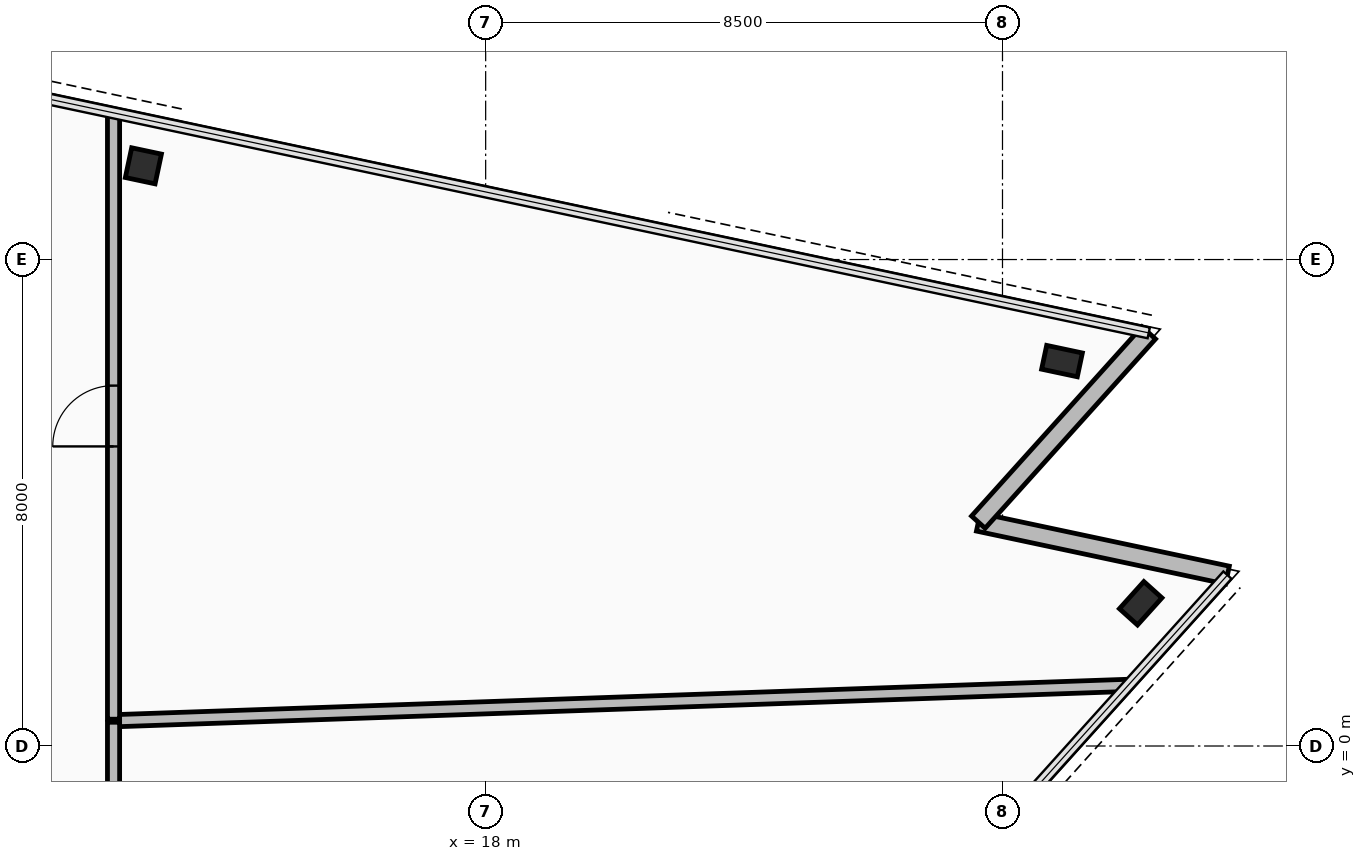
"""IFC4 building model, lengths in metres.
Left out: names, types, materials, properties, quantities, classifications, styles, units other than length and angle.
Written with IfcOpenShell. Run it as: python <this file> out.ifc"""

import sys

from ifc_helpers import new_model, si_unit, direction, frame, frame_2d, origin, origin_2d, place, context, subcontext, project, spatial, rectangle, hollow_rectangle, extrude, element, fill, save


model = new_model("IFC4")
c1 = context("Model", 3, precision=1e-05, world=origin(), true_north=direction((0.0, 1.0)))
c2 = subcontext(c1, "Body", "Model", "MODEL_VIEW")
j1 = project(units=[si_unit("LENGTHUNIT", "METRE"), si_unit("PLANEANGLEUNIT", "RADIAN")], contexts=[c1])
p1 = place(None, origin())
s1 = spatial("IfcSite", under=j1, at=p1, CompositionType="ELEMENT")
p2 = place(p1, origin())
s2 = spatial("IfcBuilding", under=s1, at=p2, CompositionType="ELEMENT")
p3 = place(p2, frame((0.0, 0.0, 218.45)))
s3 = spatial("IfcBuildingStorey", under=s2, at=p3, CompositionType="ELEMENT", Elevation=218.45)
for number, where, z_axis, x_axis in (
    (1, (28.773, 2.347, 0.0), (0.0, 0.0, 1.0), (0.669, 0.743, 0.0)),
    (2, (27.479, 6.33, 0.0), (0.0, 0.0, 1.0), (-0.978, 0.208, 0.0)),
):
    element("IfcColumn", number, at=place(p3, frame(where, z_axis=z_axis, x_axis=x_axis)), inside=s3, PredefinedType="COLUMN", context=c2, shape_type="SweptSolid", body=[
        extrude(hollow_rectangle(XDim=0.4, YDim=0.6, WallThickness=0.03, at=origin_2d()), origin(), (0.0, 0.0, 1.0), 3.6),
    ])
p4 = place(p3, frame((12.371, 9.542, 0.0), z_axis=(0.0, 0.0, 1.0), x_axis=(-0.978147600734, 0.207911690818, 0.0)))
e3 = element("IfcColumn", 3, at=p4, inside=s3, PredefinedType="COLUMN", context=c2, shape_type="SweptSolid", body=[
    extrude(hollow_rectangle(XDim=0.5, YDim=0.5, WallThickness=0.032, at=origin_2d()), origin(), (0.0, 0.0, 1.0), 3.6),
])
for number, where, z_axis, x_axis in (
    (4, (30.199, 2.811, 0.0), (0.0, 0.0, 1.0), (-0.978, 0.208, 0.0)),
    (5, (26.103, 3.681, 0.0), (0.0, 0.0, 1.0), (0.669, 0.743, 0.0)),
):
    element("IfcWall", number, at=place(p3, frame(where, z_axis=z_axis, x_axis=x_axis)), inside=s3, PredefinedType="STANDARD", context=c2, shape_type="SweptSolid", body=[
        extrude(rectangle(XDim=4.188, YDim=0.3, at=frame_2d((2.094, 0.0))), origin(), (0.0, 0.0, 1.0), 2.655),
    ])
p5 = place(p3, frame((28.556, 0.997, 0.0), z_axis=(0.0, 0.0, 1.0), x_axis=(-0.999390620762, -0.03490540262, 0.0)))
e6 = element("IfcWall", 6, at=p5, inside=s3, PredefinedType="PARTITIONING", context=c2, shape_type="SweptSolid", body=[
    extrude(rectangle(XDim=16.661, YDim=0.2, at=frame_2d((8.33, 0.0))), origin(), (0.0, 0.0, 1.0), 2.655),
])
p6 = place(p3, frame((11.88, 0.441, 0.0), z_axis=(0.0, 0.0, 1.0), x_axis=(0.0, 1.0, 0.0)))
e7 = element("IfcWall", 7, at=p6, inside=s3, PredefinedType="PARTITIONING", context=c2, shape_type="SweptSolid", body=[
    extrude(rectangle(XDim=9.972, YDim=0.2, at=frame_2d((4.986, 0.0))), origin(), (0.0, 0.0, 1.0), 2.655),
])
p7 = place(p6, frame((4.486, 0.0, 0.0)))
e8 = element("IfcOpeningElement", 8, at=p7, cuts=e7, PredefinedType="OPENING", context=c2, shape_type="SweptSolid", body=[
    extrude(rectangle(XDim=1.0, YDim=2.15, at=frame_2d((0.5, 1.075))), frame((0.0, 0.11, 0.0), z_axis=(0.0, -1.0, 0.0), x_axis=(1.0, 0.0, 0.0)), (0.0, 0.0, 1.0), 0.22),
])
p8 = place(p3, frame((11.88, -10.579, 0.0), z_axis=(0.0, 0.0, 1.0), x_axis=(0.0, 1.0, 0.0)))
e9 = element("IfcWall", 9, at=p8, inside=s3, PredefinedType="PARTITIONING", context=c2, shape_type="SweptSolid", body=[
    extrude(rectangle(XDim=10.97, YDim=0.2, at=frame_2d((5.485, 0.0))), origin(), (0.0, 0.0, 1.0), 2.805),
])
p9 = place(p7, origin())
e10 = element("IfcDoor", 10, at=p9, inside=s3, OperationType="SINGLE_SWING_RIGHT", PredefinedType="DOOR", context=c2, shape_type="SweptSolid", body=[
    extrude(rectangle(XDim=1.0, YDim=2.15, at=frame_2d((0.5, 1.075))), frame((0.0, 0.025, 0.0), z_axis=(0.0, -1.0, 0.0), x_axis=(1.0, 0.0, 0.0)), (0.0, 0.0, 1.0), 0.05),
])
fill(e8, e10)
save(model, sys.argv[1])
